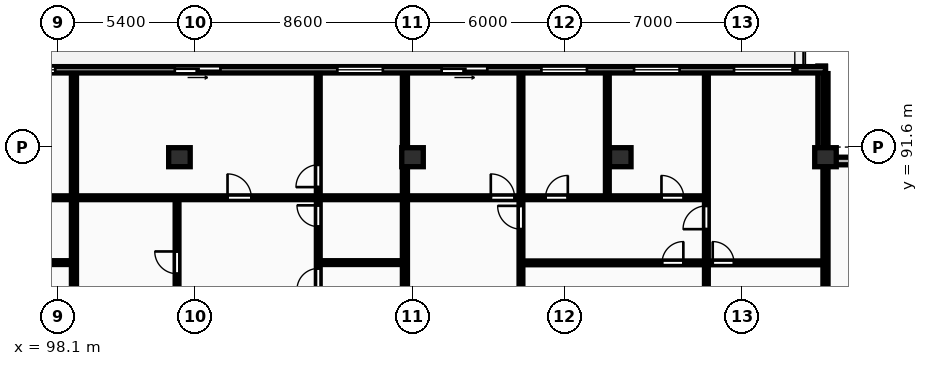
"""IFC4 building model, lengths in metres.
Left out: names, types, materials, properties, quantities, classifications, styles, units other than length and angle.
Written with IfcOpenShell. Run it as: python <this file> out.ifc"""

import sys

from ifc_helpers import new_model, si_unit, direction, frame, frame_2d, origin, origin_2d, place, context, subcontext, project, spatial, rectangle, extrude, element, fill, save


model = new_model("IFC4")
c1 = context("Model", 3, precision=1e-05, world=origin(), true_north=direction((0.0, 1.0)))
c2 = subcontext(c1, "Body", "Model", "MODEL_VIEW")
j1 = project(units=[si_unit("LENGTHUNIT", "METRE"), si_unit("PLANEANGLEUNIT", "RADIAN")], contexts=[c1])
p1 = place(None, origin())
s1 = spatial("IfcSite", under=j1, at=p1, CompositionType="ELEMENT")
p2 = place(p1, origin())
s2 = spatial("IfcBuilding", under=s1, at=p2, CompositionType="ELEMENT")
p3 = place(p2, frame((0.0, 0.0, 210.85)))
s3 = spatial("IfcBuildingStorey", under=s2, at=p3, CompositionType="ELEMENT", Elevation=210.85)
for number, where, z_axis, x_axis in (
    (1, (102.9, 91.2, 0.0), (0.0, 0.0, 1.0), (1.0, 0.0, 0.0)),
    (2, (112.1, 91.2, 0.0), (0.0, 0.0, 1.0), (1.0, 0.0, 0.0)),
    (3, (120.3, 91.2, 0.0), (0.0, 0.0, 1.0), (1.0, 0.0, 0.0)),
    (4, (128.4, 91.2, 0.0), (0.0, 0.0, 1.0), (1.0, 0.0, 0.0)),
):
    element("IfcColumn", number, at=place(p3, frame(where, z_axis=z_axis, x_axis=x_axis)), inside=s3, PredefinedType="COLUMN", context=c2, shape_type="SweptSolid", body=[
        extrude(rectangle(XDim=0.85, YDim=0.75, at=origin_2d()), origin(), (0.0, 0.0, 1.0), 3.25),
    ])
for number, where, z_axis, x_axis in (
    (5, (132.0, 91.05, 0.0), (0.0, 0.0, 1.0), (-1.0, 0.0, 0.0)),
    (6, (128.25, 91.2, 0.0), (0.0, 0.0, 1.0), (0.0, 1.0, 0.0)),
):
    element("IfcWall", number, at=place(p3, frame(where, z_axis=z_axis, x_axis=x_axis)), inside=s3, PredefinedType="STANDARD", context=c2, shape_type="SweptSolid", body=[
        extrude(rectangle(XDim=3.6, YDim=0.3, at=frame_2d((1.8, 0.0))), origin(), (0.0, 0.0, 1.0), 2.97),
    ])
p4 = place(p3, frame((128.4, 94.65, 0.0), z_axis=(0.0, 0.0, 1.0), x_axis=(-1.0, 0.0, 0.0)))
e7 = element("IfcWall", 7, at=p4, inside=s3, PredefinedType="STANDARD", context=c2, shape_type="SweptSolid", body=[
    extrude(rectangle(XDim=68.6, YDim=0.25, at=frame_2d((34.3, 0.0))), origin(), (0.0, 0.0, 1.0), 2.97),
])
p5 = place(p4, frame((62.6, 0.0, 0.0)))
e8 = element("IfcOpeningElement", 8, at=p5, cuts=e7, PredefinedType="OPENING", context=c2, shape_type="SweptSolid", body=[
    extrude(rectangle(XDim=1.8, YDim=2.2, at=frame_2d((0.9, 1.1))), frame((0.0, 0.135, 0.0), z_axis=(0.0, -1.0, 0.0), x_axis=(1.0, 0.0, 0.0)), (0.0, 0.0, 1.0), 0.27),
])
p6 = place(p4, frame((56.252, 0.0, 0.85)))
e9 = element("IfcOpeningElement", 9, at=p6, cuts=e7, PredefinedType="OPENING", context=c2, shape_type="SweptSolid", body=[
    extrude(rectangle(XDim=1.8, YDim=1.8, at=frame_2d((0.9, 0.9))), frame((0.0, 0.135, 0.0), z_axis=(0.0, -1.0, 0.0), x_axis=(1.0, 0.0, 0.0)), (0.0, 0.0, 1.0), 0.27),
])
p7 = place(p4, frame((49.882, 0.0, 0.0)))
e10 = element("IfcOpeningElement", 10, at=p7, cuts=e7, PredefinedType="OPENING", context=c2, shape_type="SweptSolid", body=[
    extrude(rectangle(XDim=1.8, YDim=2.2, at=frame_2d((0.9, 1.1))), frame((0.0, 0.135, 0.0), z_axis=(0.0, -1.0, 0.0), x_axis=(1.0, 0.0, 0.0)), (0.0, 0.0, 1.0), 0.27),
])
p8 = place(p4, frame((43.47, 0.0, 0.85)))
e11 = element("IfcOpeningElement", 11, at=p8, cuts=e7, PredefinedType="OPENING", context=c2, shape_type="SweptSolid", body=[
    extrude(rectangle(XDim=1.8, YDim=1.8, at=frame_2d((0.9, 0.9))), frame((0.0, 0.135, 0.0), z_axis=(0.0, -1.0, 0.0), x_axis=(1.0, 0.0, 0.0)), (0.0, 0.0, 1.0), 0.27),
])
p9 = place(p4, frame((36.75, 0.0, 0.0)))
e12 = element("IfcOpeningElement", 12, at=p9, cuts=e7, PredefinedType="OPENING", context=c2, shape_type="SweptSolid", body=[
    extrude(rectangle(XDim=1.8, YDim=2.2, at=frame_2d((0.9, 1.1))), frame((0.0, 0.135, 0.0), z_axis=(0.0, -1.0, 0.0), x_axis=(1.0, 0.0, 0.0)), (0.0, 0.0, 1.0), 0.27),
])
p10 = place(p4, frame((30.402, 0.0, 0.85)))
e13 = element("IfcOpeningElement", 13, at=p10, cuts=e7, PredefinedType="OPENING", context=c2, shape_type="SweptSolid", body=[
    extrude(rectangle(XDim=1.8, YDim=1.8, at=frame_2d((0.9, 0.9))), frame((0.0, 0.135, 0.0), z_axis=(0.0, -1.0, 0.0), x_axis=(1.0, 0.0, 0.0)), (0.0, 0.0, 1.0), 0.27),
])
p11 = place(p4, frame((23.882, 0.0, 0.0)))
e14 = element("IfcOpeningElement", 14, at=p11, cuts=e7, PredefinedType="OPENING", context=c2, shape_type="SweptSolid", body=[
    extrude(rectangle(XDim=1.8, YDim=2.2, at=frame_2d((0.9, 1.1))), frame((0.0, 0.135, 0.0), z_axis=(0.0, -1.0, 0.0), x_axis=(1.0, 0.0, 0.0)), (0.0, 0.0, 1.0), 0.27),
])
p12 = place(p4, frame((17.47, 0.0, 0.85)))
e15 = element("IfcOpeningElement", 15, at=p12, cuts=e7, PredefinedType="OPENING", context=c2, shape_type="SweptSolid", body=[
    extrude(rectangle(XDim=1.8, YDim=1.8, at=frame_2d((0.9, 0.9))), frame((0.0, 0.135, 0.0), z_axis=(0.0, -1.0, 0.0), x_axis=(1.0, 0.0, 0.0)), (0.0, 0.0, 1.0), 0.27),
])
p13 = place(p4, frame((9.415, 0.0, 0.85)))
e16 = element("IfcOpeningElement", 16, at=p13, cuts=e7, PredefinedType="OPENING", context=c2, shape_type="SweptSolid", body=[
    extrude(rectangle(XDim=1.8, YDim=1.8, at=frame_2d((0.9, 0.9))), frame((0.0, 0.135, 0.0), z_axis=(0.0, -1.0, 0.0), x_axis=(1.0, 0.0, 0.0)), (0.0, 0.0, 1.0), 0.27),
])
p14 = place(p4, frame((5.756, 0.0, 0.85)))
e17 = element("IfcOpeningElement", 17, at=p14, cuts=e7, PredefinedType="OPENING", context=c2, shape_type="SweptSolid", body=[
    extrude(rectangle(XDim=1.8, YDim=1.8, at=frame_2d((0.9, 0.9))), frame((0.0, 0.135, 0.0), z_axis=(0.0, -1.0, 0.0), x_axis=(1.0, 0.0, 0.0)), (0.0, 0.0, 1.0), 0.27),
])
p15 = place(p4, frame((13.35, 0.0, 0.0)))
e18 = element("IfcOpeningElement", 18, at=p15, cuts=e7, PredefinedType="OPENING", context=c2, shape_type="SweptSolid", body=[
    extrude(rectangle(XDim=1.8, YDim=2.2, at=frame_2d((0.9, 1.1))), frame((0.0, 0.135, 0.0), z_axis=(0.0, -1.0, 0.0), x_axis=(1.0, 0.0, 0.0)), (0.0, 0.0, 1.0), 0.27),
])
p16 = place(p4, frame((1.21, 0.0, 0.85)))
e19 = element("IfcOpeningElement", 19, at=p16, cuts=e7, PredefinedType="OPENING", context=c2, shape_type="SweptSolid", body=[
    extrude(rectangle(XDim=2.4, YDim=1.9, at=frame_2d((1.2, 0.95))), frame((0.0, 0.135, 0.0), z_axis=(0.0, -1.0, 0.0), x_axis=(1.0, 0.0, 0.0)), (0.0, 0.0, 1.0), 0.27),
])
p17 = place(p3, frame((128.4, 70.18, 0.0), z_axis=(0.0, 0.0, 1.0), x_axis=(0.0, 1.0, 0.0)))
e20 = element("IfcWall", 20, at=p17, inside=s3, PredefinedType="PARTITIONING", context=c2, shape_type="SweptSolid", body=[
    extrude(rectangle(XDim=24.32, YDim=0.2, at=frame_2d((12.16, 0.0))), origin(), (0.0, 0.0, 1.0), 2.277),
])
p18 = place(p3, frame((98.736, 70.18, 0.0), z_axis=(0.0, 0.0, 1.0), x_axis=(0.0, 1.0, 0.0)))
e21 = element("IfcWall", 21, at=p18, inside=s3, PredefinedType="PARTITIONING", context=c2, shape_type="SweptSolid", body=[
    extrude(rectangle(XDim=24.32, YDim=0.2, at=frame_2d((12.16, 0.0))), origin(), (0.0, 0.0, 1.0), 2.97),
])
p19 = place(p3, frame((95.64, 87.04, 0.0), z_axis=(0.0, 0.0, 1.0), x_axis=(1.0, 0.0, 0.0)))
e22 = element("IfcWall", 22, at=p19, inside=s3, PredefinedType="PARTITIONING", context=c2, shape_type="SweptSolid", body=[
    extrude(rectangle(XDim=3.016, YDim=0.15, at=frame_2d((1.508, 0.0))), origin(), (0.0, 0.0, 1.0), 2.97),
])
p20 = place(p3, frame((85.88, 89.6, 0.0), z_axis=(0.0, 0.0, 1.0), x_axis=(1.0, 0.0, 0.0)))
e23 = element("IfcWall", 23, at=p20, inside=s3, PredefinedType="PARTITIONING", context=c2, shape_type="SweptSolid", body=[
    extrude(rectangle(XDim=12.776, YDim=0.15, at=frame_2d((6.388, 0.0))), origin(), (0.0, 0.0, 1.0), 2.97),
])
p21 = place(p20, frame((5.206, 0.0, 0.0)))
e24 = element("IfcOpeningElement", 24, at=p21, cuts=e23, PredefinedType="OPENING", context=c2, shape_type="SweptSolid", body=[
    extrude(rectangle(XDim=0.94, YDim=2.1, at=frame_2d((0.47, 1.05))), frame((0.0, 0.085, 0.0), z_axis=(0.0, -1.0, 0.0), x_axis=(1.0, 0.0, 0.0)), (0.0, 0.0, 1.0), 0.17),
])
p22 = place(p3, frame((111.8, 70.18, 0.0), z_axis=(0.0, 0.0, 1.0), x_axis=(0.0, 1.0, 0.0)))
e25 = element("IfcWall", 25, at=p22, inside=s3, PredefinedType="PARTITIONING", context=c2, shape_type="SweptSolid", body=[
    extrude(rectangle(XDim=24.32, YDim=0.2, at=frame_2d((12.16, 0.0))), origin(), (0.0, 0.0, 1.0), 2.97),
])
p23 = place(p3, frame((102.806, 84.54, 0.0), z_axis=(0.0, 0.0, 1.0), x_axis=(0.0, 1.0, 0.0)))
e26 = element("IfcWall", 26, at=p23, inside=s3, PredefinedType="PARTITIONING", context=c2, shape_type="SweptSolid", body=[
    extrude(rectangle(XDim=5.0, YDim=0.15, at=frame_2d((2.5, 0.0))), origin(), (0.0, 0.0, 1.0), 2.277),
])
p24 = place(p23, frame((2.06, 0.0, 0.0)))
e27 = element("IfcOpeningElement", 27, at=p24, cuts=e26, PredefinedType="OPENING", context=c2, shape_type="SweptSolid", body=[
    extrude(rectangle(XDim=0.88, YDim=2.06, at=frame_2d((0.44, 1.03))), frame((0.0, 0.085, 0.0), z_axis=(0.0, -1.0, 0.0), x_axis=(1.0, 0.0, 0.0)), (0.0, 0.0, 1.0), 0.17),
])
p25 = place(p3, frame((108.44, 87.04, 0.0), z_axis=(0.0, 0.0, 1.0), x_axis=(1.0, 0.0, 0.0)))
e28 = element("IfcWall", 28, at=p25, inside=s3, PredefinedType="PARTITIONING", context=c2, shape_type="SweptSolid", body=[
    extrude(rectangle(XDim=3.28, YDim=0.15, at=frame_2d((1.64, 0.0))), origin(), (0.0, 0.0, 1.0), 2.97),
])
p26 = place(p3, frame((108.38, 84.54, 0.0), z_axis=(0.0, 0.0, 1.0), x_axis=(0.0, 1.0, 0.0)))
e29 = element("IfcWall", 29, at=p26, inside=s3, PredefinedType="PARTITIONING", context=c2, shape_type="SweptSolid", body=[
    extrude(rectangle(XDim=9.96, YDim=0.15, at=frame_2d((4.98, 0.0))), origin(), (0.0, 0.0, 1.0), 2.97),
])
p27 = place(p26, frame((1.43, 0.0, 0.0)))
e30 = element("IfcOpeningElement", 30, at=p27, cuts=e29, PredefinedType="OPENING", context=c2, shape_type="SweptSolid", body=[
    extrude(rectangle(XDim=0.84, YDim=2.04, at=frame_2d((0.42, 1.02))), frame((0.0, 0.085, 0.0), z_axis=(0.0, -1.0, 0.0), x_axis=(1.0, 0.0, 0.0)), (0.0, 0.0, 1.0), 0.17),
])
p28 = place(p26, frame((3.92, 0.0, 0.0)))
e31 = element("IfcOpeningElement", 31, at=p28, cuts=e29, PredefinedType="OPENING", context=c2, shape_type="SweptSolid", body=[
    extrude(rectangle(XDim=0.84, YDim=2.04, at=frame_2d((0.42, 1.02))), frame((0.0, 0.085, 0.0), z_axis=(0.0, -1.0, 0.0), x_axis=(1.0, 0.0, 0.0)), (0.0, 0.0, 1.0), 0.17),
])
p29 = place(p26, frame((5.48, 0.0, 0.0)))
e32 = element("IfcOpeningElement", 32, at=p29, cuts=e29, PredefinedType="OPENING", context=c2, shape_type="SweptSolid", body=[
    extrude(rectangle(XDim=0.88, YDim=2.06, at=frame_2d((0.44, 1.03))), frame((0.0, 0.085, 0.0), z_axis=(0.0, -1.0, 0.0), x_axis=(1.0, 0.0, 0.0)), (0.0, 0.0, 1.0), 0.17),
])
p30 = place(p3, frame((98.816, 89.6, 0.0), z_axis=(0.0, 0.0, 1.0), x_axis=(1.0, 0.0, 0.0)))
e33 = element("IfcWall", 33, at=p30, inside=s3, PredefinedType="PARTITIONING", context=c2, shape_type="SweptSolid", body=[
    extrude(rectangle(XDim=12.904, YDim=0.15, at=frame_2d((6.452, 0.0))), origin(), (0.0, 0.0, 1.0), 2.97),
])
p31 = place(p30, frame((5.982, 0.0, 0.0)))
e34 = element("IfcOpeningElement", 34, at=p31, cuts=e33, PredefinedType="OPENING", context=c2, shape_type="SweptSolid", body=[
    extrude(rectangle(XDim=0.94, YDim=2.1, at=frame_2d((0.47, 1.05))), frame((0.0, 0.085, 0.0), z_axis=(0.0, -1.0, 0.0), x_axis=(1.0, 0.0, 0.0)), (0.0, 0.0, 1.0), 0.17),
])
p32 = place(p3, frame((119.79, 89.68, 0.0), z_axis=(0.0, 0.0, 1.0), x_axis=(0.0, 1.0, 0.0)))
e35 = element("IfcWall", 35, at=p32, inside=s3, PredefinedType="PARTITIONING", context=c2, shape_type="SweptSolid", body=[
    extrude(rectangle(XDim=4.82, YDim=0.15, at=frame_2d((2.41, 0.0))), origin(), (0.0, 0.0, 1.0), 2.97),
])
p33 = place(p3, frame((116.38, 84.54, 0.0), z_axis=(0.0, 0.0, 1.0), x_axis=(0.0, 1.0, 0.0)))
e36 = element("IfcWall", 36, at=p33, inside=s3, PredefinedType="PARTITIONING", context=c2, shape_type="SweptSolid", body=[
    extrude(rectangle(XDim=9.96, YDim=0.15, at=frame_2d((4.98, 0.0))), origin(), (0.0, 0.0, 1.0), 2.97),
])
p34 = place(p33, frame((3.82, 0.0, 0.0)))
e37 = element("IfcOpeningElement", 37, at=p34, cuts=e36, PredefinedType="OPENING", context=c2, shape_type="SweptSolid", body=[
    extrude(rectangle(XDim=0.92, YDim=2.08, at=frame_2d((0.46, 1.04))), frame((0.0, 0.085, 0.0), z_axis=(0.0, -1.0, 0.0), x_axis=(1.0, 0.0, 0.0)), (0.0, 0.0, 1.0), 0.17),
])
p35 = place(p3, frame((123.699, 84.54, 0.0), z_axis=(0.0, 0.0, 1.0), x_axis=(0.0, 1.0, 0.0)))
e38 = element("IfcWall", 38, at=p35, inside=s3, PredefinedType="PARTITIONING", context=c2, shape_type="SweptSolid", body=[
    extrude(rectangle(XDim=2.47, YDim=0.15, at=frame_2d((1.235, 0.0))), origin(), (0.0, 0.0, 1.0), 2.97),
])
p36 = place(p3, frame((123.699, 87.05, 0.0), z_axis=(0.0, 0.0, 1.0), x_axis=(0.0, 1.0, 0.0)))
e39 = element("IfcWall", 39, at=p36, inside=s3, PredefinedType="PARTITIONING", context=c2, shape_type="SweptSolid", body=[
    extrude(rectangle(XDim=7.45, YDim=0.15, at=frame_2d((3.725, 0.0))), origin(), (0.0, 0.0, 1.0), 2.97),
])
p37 = place(p36, frame((1.31, 0.0, 0.0)))
e40 = element("IfcOpeningElement", 40, at=p37, cuts=e39, PredefinedType="OPENING", context=c2, shape_type="SweptSolid", body=[
    extrude(rectangle(XDim=0.92, YDim=2.08, at=frame_2d((0.46, 1.04))), frame((0.0, 0.085, 0.0), z_axis=(0.0, -1.0, 0.0), x_axis=(1.0, 0.0, 0.0)), (0.0, 0.0, 1.0), 0.17),
])
p38 = place(p3, frame((116.42, 87.03, 0.0), z_axis=(0.0, 0.0, 1.0), x_axis=(1.0, 0.0, 0.0)))
e41 = element("IfcWall", 41, at=p38, inside=s3, PredefinedType="PARTITIONING", context=c2, shape_type="SweptSolid", body=[
    extrude(rectangle(XDim=11.9, YDim=0.15, at=frame_2d((5.95, 0.0))), origin(), (0.0, 0.0, 1.0), 2.97),
])
p39 = place(p38, frame((5.53, 0.0, 0.0)))
e42 = element("IfcOpeningElement", 42, at=p39, cuts=e41, PredefinedType="OPENING", context=c2, shape_type="SweptSolid", body=[
    extrude(rectangle(XDim=0.84, YDim=2.04, at=frame_2d((0.42, 1.02))), frame((0.0, 0.085, 0.0), z_axis=(0.0, -1.0, 0.0), x_axis=(1.0, 0.0, 0.0)), (0.0, 0.0, 1.0), 0.17),
])
p40 = place(p38, frame((7.529, 0.0, 0.0)))
e43 = element("IfcOpeningElement", 43, at=p40, cuts=e41, PredefinedType="OPENING", context=c2, shape_type="SweptSolid", body=[
    extrude(rectangle(XDim=0.84, YDim=2.04, at=frame_2d((0.42, 1.02))), frame((0.0, 0.085, 0.0), z_axis=(0.0, -1.0, 0.0), x_axis=(1.0, 0.0, 0.0)), (0.0, 0.0, 1.0), 0.17),
])
p41 = place(p3, frame((111.88, 89.6, 0.0), z_axis=(0.0, 0.0, 1.0), x_axis=(1.0, 0.0, 0.0)))
e44 = element("IfcWall", 44, at=p41, inside=s3, PredefinedType="PARTITIONING", context=c2, shape_type="SweptSolid", body=[
    extrude(rectangle(XDim=11.819, YDim=0.15, at=frame_2d((5.91, 0.0))), origin(), (0.0, 0.0, 1.0), 2.97),
])
p42 = place(p41, frame((3.31, 0.0, 0.0)))
e45 = element("IfcOpeningElement", 45, at=p42, cuts=e44, PredefinedType="OPENING", context=c2, shape_type="SweptSolid", body=[
    extrude(rectangle(XDim=0.94, YDim=2.1, at=frame_2d((0.47, 1.05))), frame((0.0, 0.085, 0.0), z_axis=(0.0, -1.0, 0.0), x_axis=(1.0, 0.0, 0.0)), (0.0, 0.0, 1.0), 0.17),
])
p43 = place(p41, frame((5.469, 0.0, 0.0)))
e46 = element("IfcOpeningElement", 46, at=p43, cuts=e44, PredefinedType="OPENING", context=c2, shape_type="SweptSolid", body=[
    extrude(rectangle(XDim=0.88, YDim=2.06, at=frame_2d((0.44, 1.03))), frame((0.0, 0.085, 0.0), z_axis=(0.0, -1.0, 0.0), x_axis=(1.0, 0.0, 0.0)), (0.0, 0.0, 1.0), 0.17),
])
p44 = place(p41, frame((10.046, 0.0, 0.0)))
e47 = element("IfcOpeningElement", 47, at=p44, cuts=e44, PredefinedType="OPENING", context=c2, shape_type="SweptSolid", body=[
    extrude(rectangle(XDim=0.88, YDim=2.06, at=frame_2d((0.44, 1.03))), frame((0.0, 0.085, 0.0), z_axis=(0.0, -1.0, 0.0), x_axis=(1.0, 0.0, 0.0)), (0.0, 0.0, 1.0), 0.17),
])
p45 = place(p10, origin())
e48 = element("IfcWindow", 48, at=p45, inside=s3, PartitioningType="SINGLE_PANEL", PredefinedType="WINDOW", context=c2, shape_type="SweptSolid", body=[
    extrude(rectangle(XDim=1.8, YDim=1.8, at=frame_2d((0.9, 0.9))), frame((0.0, 0.03, 0.0), z_axis=(0.0, -1.0, 0.0), x_axis=(1.0, 0.0, 0.0)), (0.0, 0.0, 1.0), 0.06),
])
fill(e13, e48)
p46 = place(p11, origin())
e49 = element("IfcDoor", 49, at=p46, inside=s3, OperationType="SLIDING_TO_LEFT", PredefinedType="DOOR", context=c2, shape_type="SweptSolid", body=[
    extrude(rectangle(XDim=1.8, YDim=2.2, at=frame_2d((0.9, 1.1))), frame((0.0, 0.025, 0.0), z_axis=(0.0, -1.0, 0.0), x_axis=(1.0, 0.0, 0.0)), (0.0, 0.0, 1.0), 0.05),
])
fill(e14, e49)
p47 = place(p12, origin())
e50 = element("IfcWindow", 50, at=p47, inside=s3, PartitioningType="SINGLE_PANEL", PredefinedType="WINDOW", context=c2, shape_type="SweptSolid", body=[
    extrude(rectangle(XDim=1.8, YDim=1.8, at=frame_2d((0.9, 0.9))), frame((0.0, 0.03, 0.0), z_axis=(0.0, -1.0, 0.0), x_axis=(1.0, 0.0, 0.0)), (0.0, 0.0, 1.0), 0.06),
])
fill(e15, e50)
p48 = place(p13, origin())
e51 = element("IfcWindow", 51, at=p48, inside=s3, PartitioningType="SINGLE_PANEL", PredefinedType="WINDOW", context=c2, shape_type="SweptSolid", body=[
    extrude(rectangle(XDim=1.8, YDim=1.8, at=frame_2d((0.9, 0.9))), frame((0.0, 0.03, 0.0), z_axis=(0.0, -1.0, 0.0), x_axis=(1.0, 0.0, 0.0)), (0.0, 0.0, 1.0), 0.06),
])
fill(e16, e51)
p49 = place(p14, origin())
e52 = element("IfcWindow", 52, at=p49, inside=s3, PartitioningType="SINGLE_PANEL", PredefinedType="WINDOW", context=c2, shape_type="SweptSolid", body=[
    extrude(rectangle(XDim=1.8, YDim=1.8, at=frame_2d((0.9, 0.9))), frame((0.0, 0.03, 0.0), z_axis=(0.0, -1.0, 0.0), x_axis=(1.0, 0.0, 0.0)), (0.0, 0.0, 1.0), 0.06),
])
fill(e17, e52)
p50 = place(p15, origin())
e53 = element("IfcDoor", 53, at=p50, inside=s3, OperationType="SLIDING_TO_LEFT", PredefinedType="DOOR", context=c2, shape_type="SweptSolid", body=[
    extrude(rectangle(XDim=1.8, YDim=2.2, at=frame_2d((0.9, 1.1))), frame((0.0, 0.025, 0.0), z_axis=(0.0, -1.0, 0.0), x_axis=(1.0, 0.0, 0.0)), (0.0, 0.0, 1.0), 0.05),
])
fill(e18, e53)
p51 = place(p16, origin())
e54 = element("IfcWindow", 54, at=p51, inside=s3, PartitioningType="DOUBLE_PANEL_VERTICAL", PredefinedType="WINDOW", context=c2, shape_type="SweptSolid", body=[
    extrude(rectangle(XDim=2.4, YDim=1.9, at=frame_2d((1.2, 0.95))), frame((0.0, 0.03, 0.0), z_axis=(0.0, -1.0, 0.0), x_axis=(1.0, 0.0, 0.0)), (0.0, 0.0, 1.0), 0.06),
])
fill(e19, e54)
p52 = place(p24, origin())
e55 = element("IfcDoor", 55, at=p52, inside=s3, OperationType="SINGLE_SWING_RIGHT", PredefinedType="DOOR", context=c2, shape_type="SweptSolid", body=[
    extrude(rectangle(XDim=0.88, YDim=2.06, at=frame_2d((0.44, 1.03))), frame((0.0, 0.025, 0.0), z_axis=(0.0, -1.0, 0.0), x_axis=(1.0, 0.0, 0.0)), (0.0, 0.0, 1.0), 0.05),
])
fill(e27, e55)
p53 = place(p27, origin())
e56 = element("IfcDoor", 56, at=p53, inside=s3, OperationType="SINGLE_SWING_LEFT", PredefinedType="DOOR", context=c2, shape_type="SweptSolid", body=[
    extrude(rectangle(XDim=0.84, YDim=2.04, at=frame_2d((0.42, 1.02))), frame((0.0, 0.025, 0.0), z_axis=(0.0, -1.0, 0.0), x_axis=(1.0, 0.0, 0.0)), (0.0, 0.0, 1.0), 0.05),
])
fill(e30, e56)
p54 = place(p28, origin())
e57 = element("IfcDoor", 57, at=p54, inside=s3, OperationType="SINGLE_SWING_RIGHT", PredefinedType="DOOR", context=c2, shape_type="SweptSolid", body=[
    extrude(rectangle(XDim=0.84, YDim=2.04, at=frame_2d((0.42, 1.02))), frame((0.0, 0.025, 0.0), z_axis=(0.0, -1.0, 0.0), x_axis=(1.0, 0.0, 0.0)), (0.0, 0.0, 1.0), 0.05),
])
fill(e31, e57)
p55 = place(p29, origin())
e58 = element("IfcDoor", 58, at=p55, inside=s3, OperationType="SINGLE_SWING_LEFT", PredefinedType="DOOR", context=c2, shape_type="SweptSolid", body=[
    extrude(rectangle(XDim=0.88, YDim=2.06, at=frame_2d((0.44, 1.03))), frame((0.0, 0.025, 0.0), z_axis=(0.0, -1.0, 0.0), x_axis=(1.0, 0.0, 0.0)), (0.0, 0.0, 1.0), 0.05),
])
fill(e32, e58)
p56 = place(p31, origin())
e59 = element("IfcDoor", 59, at=p56, inside=s3, OperationType="SINGLE_SWING_LEFT", PredefinedType="DOOR", context=c2, shape_type="SweptSolid", body=[
    extrude(rectangle(XDim=0.94, YDim=2.1, at=frame_2d((0.47, 1.05))), frame((0.0, 0.025, 0.0), z_axis=(0.0, -1.0, 0.0), x_axis=(1.0, 0.0, 0.0)), (0.0, 0.0, 1.0), 0.05),
])
fill(e34, e59)
p57 = place(p34, origin())
e60 = element("IfcDoor", 60, at=p57, inside=s3, OperationType="SINGLE_SWING_RIGHT", PredefinedType="DOOR", context=c2, shape_type="SweptSolid", body=[
    extrude(rectangle(XDim=0.92, YDim=2.08, at=frame_2d((0.46, 1.04))), frame((0.0, 0.025, 0.0), z_axis=(0.0, -1.0, 0.0), x_axis=(1.0, 0.0, 0.0)), (0.0, 0.0, 1.0), 0.05),
])
fill(e37, e60)
p58 = place(p37, origin())
e61 = element("IfcDoor", 61, at=p58, inside=s3, OperationType="SINGLE_SWING_LEFT", PredefinedType="DOOR", context=c2, shape_type="SweptSolid", body=[
    extrude(rectangle(XDim=0.92, YDim=2.08, at=frame_2d((0.46, 1.04))), frame((0.0, 0.025, 0.0), z_axis=(0.0, -1.0, 0.0), x_axis=(1.0, 0.0, 0.0)), (0.0, 0.0, 1.0), 0.05),
])
fill(e40, e61)
p59 = place(p39, origin())
e62 = element("IfcDoor", 62, at=p59, inside=s3, OperationType="SINGLE_SWING_RIGHT", PredefinedType="DOOR", context=c2, shape_type="SweptSolid", body=[
    extrude(rectangle(XDim=0.84, YDim=2.04, at=frame_2d((0.42, 1.02))), frame((0.0, 0.025, 0.0), z_axis=(0.0, -1.0, 0.0), x_axis=(1.0, 0.0, 0.0)), (0.0, 0.0, 1.0), 0.05),
])
fill(e42, e62)
p60 = place(p40, origin())
e63 = element("IfcDoor", 63, at=p60, inside=s3, OperationType="SINGLE_SWING_LEFT", PredefinedType="DOOR", context=c2, shape_type="SweptSolid", body=[
    extrude(rectangle(XDim=0.84, YDim=2.04, at=frame_2d((0.42, 1.02))), frame((0.0, 0.025, 0.0), z_axis=(0.0, -1.0, 0.0), x_axis=(1.0, 0.0, 0.0)), (0.0, 0.0, 1.0), 0.05),
])
fill(e43, e63)
p61 = place(p42, origin())
e64 = element("IfcDoor", 64, at=p61, inside=s3, OperationType="SINGLE_SWING_LEFT", PredefinedType="DOOR", context=c2, shape_type="SweptSolid", body=[
    extrude(rectangle(XDim=0.94, YDim=2.1, at=frame_2d((0.47, 1.05))), frame((0.0, 0.025, 0.0), z_axis=(0.0, -1.0, 0.0), x_axis=(1.0, 0.0, 0.0)), (0.0, 0.0, 1.0), 0.05),
])
fill(e45, e64)
p62 = place(p43, origin())
e65 = element("IfcDoor", 65, at=p62, inside=s3, OperationType="SINGLE_SWING_RIGHT", PredefinedType="DOOR", context=c2, shape_type="SweptSolid", body=[
    extrude(rectangle(XDim=0.88, YDim=2.06, at=frame_2d((0.44, 1.03))), frame((0.0, 0.025, 0.0), z_axis=(0.0, -1.0, 0.0), x_axis=(1.0, 0.0, 0.0)), (0.0, 0.0, 1.0), 0.05),
])
fill(e46, e65)
p63 = place(p44, origin())
e66 = element("IfcDoor", 66, at=p63, inside=s3, OperationType="SINGLE_SWING_LEFT", PredefinedType="DOOR", context=c2, shape_type="SweptSolid", body=[
    extrude(rectangle(XDim=0.88, YDim=2.06, at=frame_2d((0.44, 1.03))), frame((0.0, 0.025, 0.0), z_axis=(0.0, -1.0, 0.0), x_axis=(1.0, 0.0, 0.0)), (0.0, 0.0, 1.0), 0.05),
])
fill(e47, e66)
save(model, sys.argv[1])
